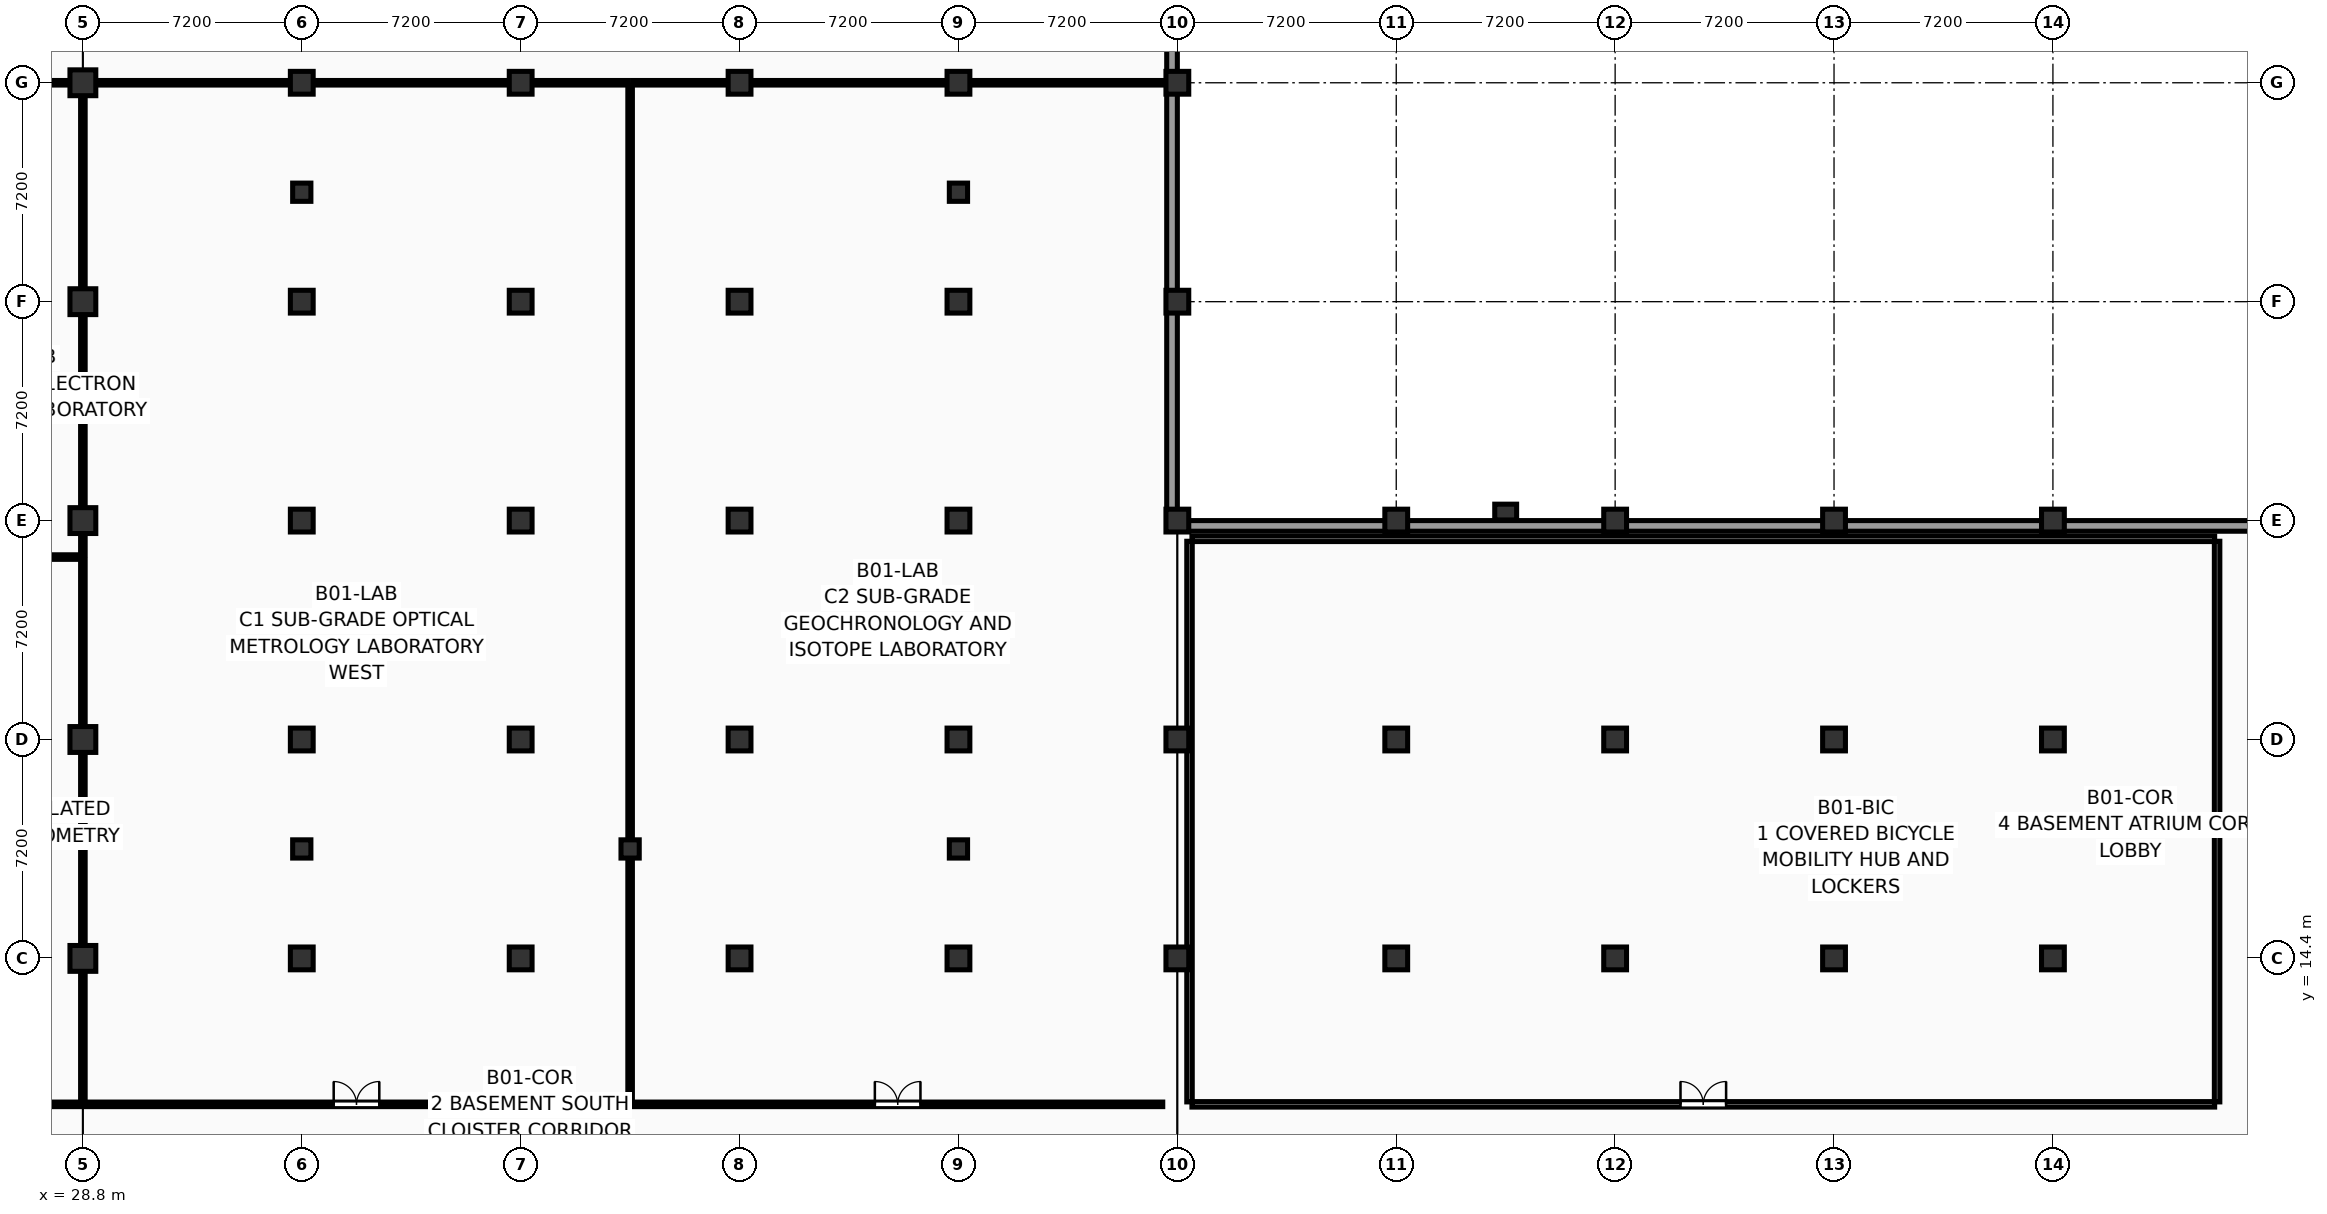
"""IFC4 building model, lengths in metres.
Left out: names, types, materials, properties, quantities, classifications, styles, units other than length and angle.
Written with IfcOpenShell. Run it as: python <this file> out.ifc"""

import sys

from ifc_helpers import new_model, si_unit, direction, frame, frame_2d, origin, origin_2d, place, context, subcontext, project, spatial, rectangle, extrude, element, fill, save


model = new_model("IFC4")
c1 = context("Model", 3, precision=1e-05, world=origin(), true_north=direction((0.0, 1.0)))
c2 = subcontext(c1, "Body", "Model", "MODEL_VIEW")
j1 = project(units=[si_unit("LENGTHUNIT", "METRE"), si_unit("PLANEANGLEUNIT", "RADIAN")], contexts=[c1])
p1 = place(None, origin())
s1 = spatial("IfcSite", under=j1, at=p1, CompositionType="ELEMENT")
p2 = place(p1, origin())
s2 = spatial("IfcBuilding", under=s1, at=p2, CompositionType="ELEMENT")
p3 = place(p2, frame((0.0, 0.0, -4.5)))
s3 = spatial("IfcBuildingStorey", under=s2, at=p3, CompositionType="ELEMENT", Elevation=-4.5)
for number, where, z_axis, x_axis in (
    (1, (28.8, 14.4, -0.3), (0.0, 0.0, 1.0), (1.0, 0.0, 0.0)),
    (2, (28.8, 21.6, -0.3), (0.0, 0.0, 1.0), (1.0, 0.0, 0.0)),
    (3, (28.8, 28.8, -0.3), (0.0, 0.0, 1.0), (1.0, 0.0, 0.0)),
    (4, (28.8, 36.0, -0.3), (0.0, 0.0, 1.0), (1.0, 0.0, 0.0)),
    (5, (28.8, 43.2, -0.3), (0.0, 0.0, 1.0), (1.0, 0.0, 0.0)),
):
    element("IfcColumn", number, at=place(p3, frame(where, z_axis=z_axis, x_axis=x_axis)), inside=s3, PredefinedType="COLUMN", context=c2, shape_type="SweptSolid", body=[
        extrude(rectangle(XDim=0.85, YDim=0.85, at=origin_2d()), origin(), (0.0, 0.0, 1.0), 4.8),
    ])
for number, where, z_axis, x_axis in (
    (6, (36.0, 14.4, -0.3), (0.0, 0.0, 1.0), (1.0, 0.0, 0.0)),
    (7, (36.0, 21.6, -0.3), (0.0, 0.0, 1.0), (1.0, 0.0, 0.0)),
    (8, (36.0, 28.8, -0.3), (0.0, 0.0, 1.0), (1.0, 0.0, 0.0)),
    (9, (36.0, 36.0, -0.3), (0.0, 0.0, 1.0), (1.0, 0.0, 0.0)),
):
    element("IfcColumn", number, at=place(p3, frame(where, z_axis=z_axis, x_axis=x_axis)), inside=s3, PredefinedType="COLUMN", context=c2, shape_type="SweptSolid", body=[
        extrude(rectangle(XDim=0.75, YDim=0.75, at=origin_2d()), origin(), (0.0, 0.0, 1.0), 4.8),
    ])
p4 = place(p3, frame((36.0, 43.2, 0.0), z_axis=(0.0, 0.0, 1.0), x_axis=(1.0, 0.0, 0.0)))
e10 = element("IfcColumn", 10, at=p4, inside=s3, PredefinedType="COLUMN", context=c2, shape_type="SweptSolid", body=[
    extrude(rectangle(XDim=0.75, YDim=0.75, at=origin_2d()), origin(), (0.0, 0.0, 1.0), 4.5),
])
for number, where, z_axis, x_axis in (
    (11, (43.2, 14.4, -0.3), (0.0, 0.0, 1.0), (1.0, 0.0, 0.0)),
    (12, (43.2, 21.6, -0.3), (0.0, 0.0, 1.0), (1.0, 0.0, 0.0)),
    (13, (43.2, 28.8, -0.3), (0.0, 0.0, 1.0), (1.0, 0.0, 0.0)),
    (14, (43.2, 36.0, -0.3), (0.0, 0.0, 1.0), (1.0, 0.0, 0.0)),
):
    element("IfcColumn", number, at=place(p3, frame(where, z_axis=z_axis, x_axis=x_axis)), inside=s3, PredefinedType="COLUMN", context=c2, shape_type="SweptSolid", body=[
        extrude(rectangle(XDim=0.75, YDim=0.75, at=origin_2d()), origin(), (0.0, 0.0, 1.0), 4.8),
    ])
p5 = place(p3, frame((43.2, 43.2, 0.0), z_axis=(0.0, 0.0, 1.0), x_axis=(1.0, 0.0, 0.0)))
e15 = element("IfcColumn", 15, at=p5, inside=s3, PredefinedType="COLUMN", context=c2, shape_type="SweptSolid", body=[
    extrude(rectangle(XDim=0.75, YDim=0.75, at=origin_2d()), origin(), (0.0, 0.0, 1.0), 4.5),
])
for number, where, z_axis, x_axis in (
    (16, (50.4, 14.4, -0.3), (0.0, 0.0, 1.0), (1.0, 0.0, 0.0)),
    (17, (50.4, 21.6, -0.3), (0.0, 0.0, 1.0), (1.0, 0.0, 0.0)),
    (18, (50.4, 28.8, -0.3), (0.0, 0.0, 1.0), (1.0, 0.0, 0.0)),
    (19, (50.4, 36.0, -0.3), (0.0, 0.0, 1.0), (1.0, 0.0, 0.0)),
    (20, (50.4, 43.2, -0.3), (0.0, 0.0, 1.0), (1.0, 0.0, 0.0)),
    (21, (57.6, 14.4, -0.3), (0.0, 0.0, 1.0), (1.0, 0.0, 0.0)),
    (22, (57.6, 21.6, -0.3), (0.0, 0.0, 1.0), (1.0, 0.0, 0.0)),
    (23, (57.6, 28.8, -0.3), (0.0, 0.0, 1.0), (1.0, 0.0, 0.0)),
    (24, (57.6, 36.0, -0.3), (0.0, 0.0, 1.0), (1.0, 0.0, 0.0)),
    (25, (57.6, 43.2, -0.3), (0.0, 0.0, 1.0), (1.0, 0.0, 0.0)),
    (26, (64.8, 14.4, -0.3), (0.0, 0.0, 1.0), (1.0, 0.0, 0.0)),
    (27, (64.8, 21.6, -0.3), (0.0, 0.0, 1.0), (1.0, 0.0, 0.0)),
    (28, (64.8, 28.8, -0.3), (0.0, 0.0, 1.0), (1.0, 0.0, 0.0)),
    (29, (64.8, 36.0, -0.3), (0.0, 0.0, 1.0), (1.0, 0.0, 0.0)),
    (30, (64.8, 43.2, -0.3), (0.0, 0.0, 1.0), (1.0, 0.0, 0.0)),
    (31, (72.0, 14.4, -0.3), (0.0, 0.0, 1.0), (1.0, 0.0, 0.0)),
    (32, (72.0, 21.6, -0.3), (0.0, 0.0, 1.0), (1.0, 0.0, 0.0)),
    (33, (72.0, 28.8, -0.3), (0.0, 0.0, 1.0), (1.0, 0.0, 0.0)),
    (34, (79.2, 14.4, -0.3), (0.0, 0.0, 1.0), (1.0, 0.0, 0.0)),
    (35, (79.2, 21.6, -0.3), (0.0, 0.0, 1.0), (1.0, 0.0, 0.0)),
    (36, (79.2, 28.8, -0.3), (0.0, 0.0, 1.0), (1.0, 0.0, 0.0)),
    (37, (86.4, 14.4, -0.3), (0.0, 0.0, 1.0), (1.0, 0.0, 0.0)),
    (38, (86.4, 21.6, -0.3), (0.0, 0.0, 1.0), (1.0, 0.0, 0.0)),
    (39, (86.4, 28.8, -0.3), (0.0, 0.0, 1.0), (1.0, 0.0, 0.0)),
    (40, (93.6, 14.4, -0.3), (0.0, 0.0, 1.0), (1.0, 0.0, 0.0)),
    (41, (93.6, 21.6, -0.3), (0.0, 0.0, 1.0), (1.0, 0.0, 0.0)),
    (42, (93.6, 28.8, -0.3), (0.0, 0.0, 1.0), (1.0, 0.0, 0.0)),
):
    element("IfcColumn", number, at=place(p3, frame(where, z_axis=z_axis, x_axis=x_axis)), inside=s3, PredefinedType="COLUMN", context=c2, shape_type="SweptSolid", body=[
        extrude(rectangle(XDim=0.75, YDim=0.75, at=origin_2d()), origin(), (0.0, 0.0, 1.0), 4.8),
    ])
for number, where, z_axis, x_axis in (
    (43, (36.0, 18.0, -0.3), (0.0, 0.0, 1.0), (1.0, 0.0, 0.0)),
    (44, (46.8, 18.0, -0.3), (0.0, 0.0, 1.0), (1.0, 0.0, 0.0)),
    (45, (57.6, 18.0, -0.3), (0.0, 0.0, 1.0), (1.0, 0.0, 0.0)),
    (46, (36.0, 39.6, -0.3), (0.0, 0.0, 1.0), (1.0, 0.0, 0.0)),
    (47, (57.6, 39.6, -0.3), (0.0, 0.0, 1.0), (1.0, 0.0, 0.0)),
):
    element("IfcColumn", number, at=place(p3, frame(where, z_axis=z_axis, x_axis=x_axis)), inside=s3, PredefinedType="COLUMN", context=c2, shape_type="SweptSolid", body=[
        extrude(rectangle(XDim=0.6, YDim=0.6, at=origin_2d()), origin(), (0.0, 0.0, 1.0), 4.8),
    ])
p6 = place(p3, frame((75.6, 29.08, -0.3), z_axis=(0.0, 0.0, 1.0), x_axis=(0.0, 1.0, 0.0)))
e48 = element("IfcColumn", 48, at=p6, inside=s3, PredefinedType="PILASTER", context=c2, shape_type="SweptSolid", body=[
    extrude(rectangle(XDim=0.52, YDim=0.72, at=origin_2d()), origin(), (0.0, 0.0, 1.0), 4.8),
])
p7 = place(p3, frame((64.625, 56.4, -0.3), z_axis=(0.0, 0.0, 1.0), x_axis=(0.0, -1.0, 0.0)))
e49 = element("IfcWall", 49, at=p7, inside=s3, PredefinedType="USERDEFINED", context=c2, shape_type="SweptSolid", body=[
    extrude(rectangle(XDim=27.6, YDim=0.35, at=frame_2d((13.8, 0.0))), origin(), (0.0, 0.0, 1.0), 4.54),
])
p8 = place(p3, frame((64.8, 28.625, -0.3), z_axis=(0.0, 0.0, 1.0), x_axis=(1.0, 0.0, 0.0)))
e50 = element("IfcWall", 50, at=p8, inside=s3, PredefinedType="USERDEFINED", context=c2, shape_type="SweptSolid", body=[
    extrude(rectangle(XDim=50.4, YDim=0.35, at=frame_2d((25.2, 0.0))), origin(), (0.0, 0.0, 1.0), 4.54),
])
p9 = place(p3, frame((20.48, 9.6, 0.0), z_axis=(0.0, 0.0, 1.0), x_axis=(1.0, 0.0, 0.0)))
e51 = element("IfcWall", 51, at=p9, inside=s3, PredefinedType="PARTITIONING", context=c2, shape_type="SweptSolid", body=[
    extrude(rectangle(XDim=8.24, YDim=0.15, at=frame_2d((4.12, 0.0))), origin(), (0.0, 0.0, 1.0), 4.225),
])
p10 = place(p9, frame((3.37, 0.0, 0.0)))
e52 = element("IfcOpeningElement", 52, at=p10, cuts=e51, PredefinedType="OPENING", context=c2, shape_type="SweptSolid", body=[
    extrude(rectangle(XDim=1.5, YDim=2.2, at=frame_2d((0.75, 1.1))), frame((0.0, 0.087, 0.0), z_axis=(0.0, -1.0, 0.0), x_axis=(1.0, 0.0, 0.0)), (0.0, 0.0, 1.0), 0.174),
])
p11 = place(p3, frame((28.8, 9.68, 0.0), z_axis=(0.0, 0.0, 1.0), x_axis=(0.0, 1.0, 0.0)))
e53 = element("IfcWall", 53, at=p11, inside=s3, PredefinedType="PARTITIONING", context=c2, shape_type="SweptSolid", body=[
    extrude(rectangle(XDim=17.84, YDim=0.15, at=frame_2d((8.92, 0.0))), origin(), (0.0, 0.0, 1.0), 3.375),
])
p12 = place(p3, frame((20.48, 27.6, 0.0), z_axis=(0.0, 0.0, 1.0), x_axis=(1.0, 0.0, 0.0)))
e54 = element("IfcWall", 54, at=p12, inside=s3, PredefinedType="PARTITIONING", context=c2, shape_type="SweptSolid", body=[
    extrude(rectangle(XDim=8.24, YDim=0.15, at=frame_2d((4.12, 0.0))), origin(), (0.0, 0.0, 1.0), 4.225),
])
p13 = place(p3, frame((28.8, 27.68, 0.0), z_axis=(0.0, 0.0, 1.0), x_axis=(0.0, 1.0, 0.0)))
e55 = element("IfcWall", 55, at=p13, inside=s3, PredefinedType="PARTITIONING", context=c2, shape_type="SweptSolid", body=[
    extrude(rectangle(XDim=15.44, YDim=0.15, at=frame_2d((7.72, 0.0))), origin(), (0.0, 0.0, 1.0), 3.375),
])
p14 = place(p3, frame((20.48, 43.2, 0.0), z_axis=(0.0, 0.0, 1.0), x_axis=(1.0, 0.0, 0.0)))
e56 = element("IfcWall", 56, at=p14, inside=s3, PredefinedType="PARTITIONING", context=c2, shape_type="SweptSolid", body=[
    extrude(rectangle(XDim=8.24, YDim=0.15, at=frame_2d((4.12, 0.0))), origin(), (0.0, 0.0, 1.0), 3.375),
])
p15 = place(p14, frame((3.37, 0.0, 0.0)))
e57 = element("IfcOpeningElement", 57, at=p15, cuts=e56, PredefinedType="OPENING", context=c2, shape_type="SweptSolid", body=[
    extrude(rectangle(XDim=1.5, YDim=2.2, at=frame_2d((0.75, 1.1))), frame((0.0, 0.087, 0.0), z_axis=(0.0, -1.0, 0.0), x_axis=(1.0, 0.0, 0.0)), (0.0, 0.0, 1.0), 0.174),
])
p16 = place(p3, frame((28.88, 9.6, 0.0), z_axis=(0.0, 0.0, 1.0), x_axis=(1.0, 0.0, 0.0)))
e58 = element("IfcWall", 58, at=p16, inside=s3, PredefinedType="PARTITIONING", context=c2, shape_type="SweptSolid", body=[
    extrude(rectangle(XDim=17.84, YDim=0.15, at=frame_2d((8.92, 0.0))), origin(), (0.0, 0.0, 1.0), 4.225),
])
p17 = place(p16, frame((8.17, 0.0, 0.0)))
e59 = element("IfcOpeningElement", 59, at=p17, cuts=e58, PredefinedType="OPENING", context=c2, shape_type="SweptSolid", body=[
    extrude(rectangle(XDim=1.5, YDim=2.2, at=frame_2d((0.75, 1.1))), frame((0.0, 0.087, 0.0), z_axis=(0.0, -1.0, 0.0), x_axis=(1.0, 0.0, 0.0)), (0.0, 0.0, 1.0), 0.174),
])
p18 = place(p3, frame((46.8, 9.68, 0.0), z_axis=(0.0, 0.0, 1.0), x_axis=(0.0, 1.0, 0.0)))
e60 = element("IfcWall", 60, at=p18, inside=s3, PredefinedType="PARTITIONING", context=c2, shape_type="SweptSolid", body=[
    extrude(rectangle(XDim=33.44, YDim=0.15, at=frame_2d((16.72, 0.0))), origin(), (0.0, 0.0, 1.0), 4.225),
])
p19 = place(p3, frame((28.88, 43.2, 0.0), z_axis=(0.0, 0.0, 1.0), x_axis=(1.0, 0.0, 0.0)))
e61 = element("IfcWall", 61, at=p19, inside=s3, PredefinedType="PARTITIONING", context=c2, shape_type="SweptSolid", body=[
    extrude(rectangle(XDim=17.84, YDim=0.15, at=frame_2d((8.92, 0.0))), origin(), (0.0, 0.0, 1.0), 3.375),
])
p20 = place(p3, frame((46.88, 9.6, 0.0), z_axis=(0.0, 0.0, 1.0), x_axis=(1.0, 0.0, 0.0)))
e62 = element("IfcWall", 62, at=p20, inside=s3, PredefinedType="PARTITIONING", context=c2, shape_type="SweptSolid", body=[
    extrude(rectangle(XDim=17.44, YDim=0.15, at=frame_2d((8.72, 0.0))), origin(), (0.0, 0.0, 1.0), 4.225),
])
p21 = place(p20, frame((7.97, 0.0, 0.0)))
e63 = element("IfcOpeningElement", 63, at=p21, cuts=e62, PredefinedType="OPENING", context=c2, shape_type="SweptSolid", body=[
    extrude(rectangle(XDim=1.5, YDim=2.2, at=frame_2d((0.75, 1.1))), frame((0.0, 0.087, 0.0), z_axis=(0.0, -1.0, 0.0), x_axis=(1.0, 0.0, 0.0)), (0.0, 0.0, 1.0), 0.174),
])
p22 = place(p3, frame((46.88, 43.2, 0.0), z_axis=(0.0, 0.0, 1.0), x_axis=(1.0, 0.0, 0.0)))
e64 = element("IfcWall", 64, at=p22, inside=s3, PredefinedType="PARTITIONING", context=c2, shape_type="SweptSolid", body=[
    extrude(rectangle(XDim=17.44, YDim=0.15, at=frame_2d((8.72, 0.0))), origin(), (0.0, 0.0, 1.0), 3.375),
])
p23 = place(p3, frame((65.2, 9.68, 0.0), z_axis=(0.0, 0.0, 1.0), x_axis=(0.0, 1.0, 0.0)))
e65 = element("IfcWall", 65, at=p23, inside=s3, PredefinedType="PARTITIONING", context=c2, shape_type="SweptSolid", body=[
    extrude(rectangle(XDim=18.44, YDim=0.18, at=frame_2d((9.22, 0.0))), origin(), (0.0, 0.0, 1.0), 3.375),
])
p24 = place(p3, frame((65.28, 9.6, 0.0), z_axis=(0.0, 0.0, 1.0), x_axis=(1.0, 0.0, 0.0)))
e66 = element("IfcWall", 66, at=p24, inside=s3, PredefinedType="PARTITIONING", context=c2, shape_type="SweptSolid", body=[
    extrude(rectangle(XDim=33.64, YDim=0.18, at=frame_2d((16.82, 0.0))), origin(), (0.0, 0.0, 1.0), 4.225),
])
p25 = place(p24, frame((16.07, 0.0, 0.0)))
e67 = element("IfcOpeningElement", 67, at=p25, cuts=e66, PredefinedType="OPENING", context=c2, shape_type="SweptSolid", body=[
    extrude(rectangle(XDim=1.5, YDim=2.25, at=frame_2d((0.75, 1.125))), frame((0.0, 0.102, 0.0), z_axis=(0.0, -1.0, 0.0), x_axis=(1.0, 0.0, 0.0)), (0.0, 0.0, 1.0), 0.204),
])
p26 = place(p3, frame((99.0, 9.68, 0.0), z_axis=(0.0, 0.0, 1.0), x_axis=(0.0, 1.0, 0.0)))
e68 = element("IfcWall", 68, at=p26, inside=s3, PredefinedType="PARTITIONING", context=c2, shape_type="SweptSolid", body=[
    extrude(rectangle(XDim=18.44, YDim=0.18, at=frame_2d((9.22, 0.0))), origin(), (0.0, 0.0, 1.0), 4.225),
])
p27 = place(p3, frame((65.28, 28.2, 0.0), z_axis=(0.0, 0.0, 1.0), x_axis=(1.0, 0.0, 0.0)))
e69 = element("IfcWall", 69, at=p27, inside=s3, PredefinedType="PARTITIONING", context=c2, shape_type="SweptSolid", body=[
    extrude(rectangle(XDim=33.64, YDim=0.18, at=frame_2d((16.82, 0.0))), origin(), (0.0, 0.0, 1.0), 4.225),
])
p28 = place(p17, origin())
e70 = element("IfcDoor", 70, at=p28, inside=s3, OperationType="DOUBLE_DOOR_SINGLE_SWING", PredefinedType="DOOR", context=c2, shape_type="SweptSolid", body=[
    extrude(rectangle(XDim=1.5, YDim=2.2, at=frame_2d((0.75, 1.1))), frame((0.0, 0.025, 0.0), z_axis=(0.0, -1.0, 0.0), x_axis=(1.0, 0.0, 0.0)), (0.0, 0.0, 1.0), 0.05),
])
fill(e59, e70)
p29 = place(p21, origin())
e71 = element("IfcDoor", 71, at=p29, inside=s3, OperationType="DOUBLE_DOOR_SINGLE_SWING", PredefinedType="DOOR", context=c2, shape_type="SweptSolid", body=[
    extrude(rectangle(XDim=1.5, YDim=2.2, at=frame_2d((0.75, 1.1))), frame((0.0, 0.025, 0.0), z_axis=(0.0, -1.0, 0.0), x_axis=(1.0, 0.0, 0.0)), (0.0, 0.0, 1.0), 0.05),
])
fill(e63, e71)
p30 = place(p25, origin())
e72 = element("IfcDoor", 72, at=p30, inside=s3, OperationType="DOUBLE_DOOR_SINGLE_SWING", PredefinedType="DOOR", context=c2, shape_type="SweptSolid", body=[
    extrude(rectangle(XDim=1.5, YDim=2.25, at=frame_2d((0.75, 1.125))), frame((0.0, 0.025, 0.0), z_axis=(0.0, -1.0, 0.0), x_axis=(1.0, 0.0, 0.0)), (0.0, 0.0, 1.0), 0.05),
])
fill(e67, e72)
save(model, sys.argv[1])
